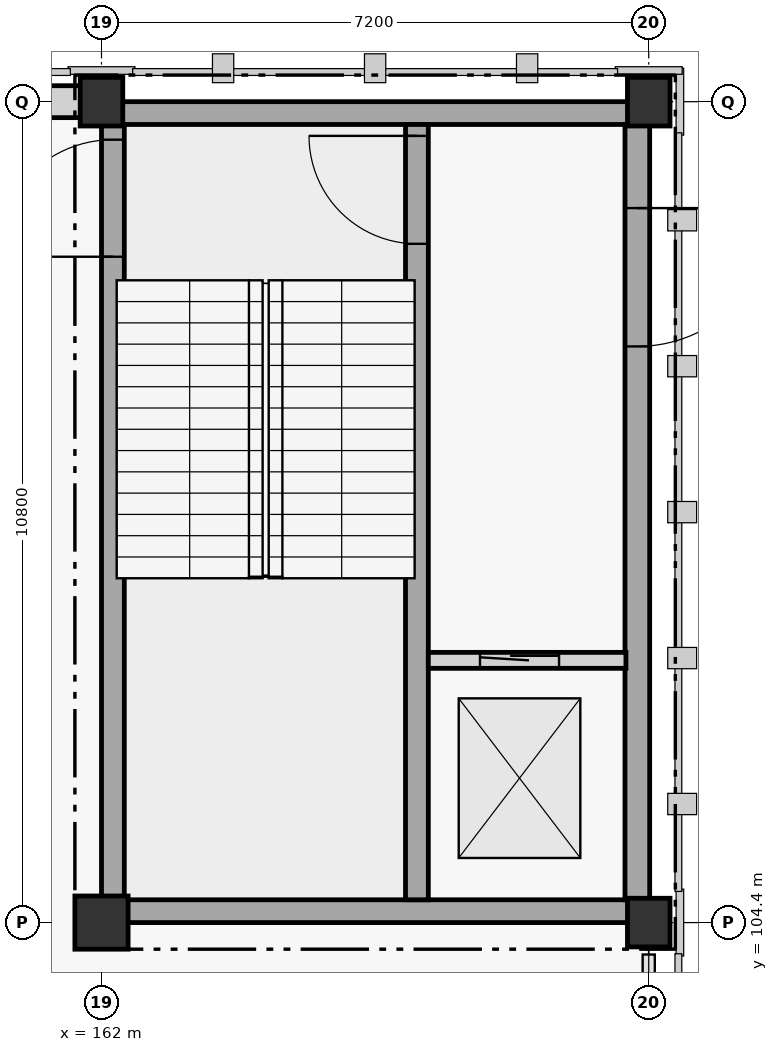
"""IFC4 building model, lengths in metres.
Left out: names, types, materials, properties, quantities, classifications, styles, units other than length and angle.
Written with IfcOpenShell. Run it as: python <this file> out.ifc"""

import sys

from ifc_helpers import new_model, si_unit, direction, frame, frame_2d, origin, origin_2d, place, context, subcontext, project, spatial, rectangle, extrude, element, fill, save


model = new_model("IFC4")
c1 = context("Model", 3, precision=1e-05, world=origin(), true_north=direction((0.0, 1.0)))
c2 = subcontext(c1, "Body", "Model", "MODEL_VIEW")
j1 = project(units=[si_unit("LENGTHUNIT", "METRE"), si_unit("PLANEANGLEUNIT", "RADIAN")], contexts=[c1])
p1 = place(None, origin())
s1 = spatial("IfcSite", under=j1, at=p1, CompositionType="ELEMENT")
p2 = place(p1, origin())
s2 = spatial("IfcBuilding", under=s1, at=p2, CompositionType="ELEMENT")
p3 = place(p2, origin())
s3 = spatial("IfcBuildingStorey", under=s2, at=p3, CompositionType="ELEMENT", Elevation=0.0)
p4 = place(p3, frame((162.0, 104.4, -0.3), z_axis=(0.0, 0.0, 1.0), x_axis=(1.0, 0.0, 0.0)))
e1 = element("IfcColumn", 1, at=p4, inside=s3, PredefinedType="COLUMN", context=c2, shape_type="SweptSolid", body=[
    extrude(rectangle(XDim=0.7, YDim=0.7, at=origin_2d()), origin(), (0.0, 0.0, 1.0), 5.7),
])
for number, where, z_axis, x_axis in (
    (2, (162.0, 115.2, -0.3), (0.0, 0.0, 1.0), (1.0, 0.0, 0.0)),
    (3, (169.2, 104.4, -0.3), (0.0, 0.0, 1.0), (1.0, 0.0, 0.0)),
    (4, (169.2, 115.2, -0.3), (0.0, 0.0, 1.0), (1.0, 0.0, 0.0)),
):
    element("IfcColumn", number, at=place(p3, frame(where, z_axis=z_axis, x_axis=x_axis)), inside=s3, PredefinedType="COLUMN", context=c2, shape_type="SweptSolid", body=[
        extrude(rectangle(XDim=0.56, YDim=0.64, at=origin_2d()), origin(), (0.0, 0.0, 1.0), 5.7),
    ])
for number, where, z_axis, x_axis in (
    (5, (169.2, 104.55, 0.0), (0.0, 0.0, 1.0), (-1.0, 0.0, 0.0)),
    (6, (162.0, 115.05, 0.0), (0.0, 0.0, 1.0), (1.0, 0.0, 0.0)),
):
    element("IfcWall", number, at=place(p3, frame(where, z_axis=z_axis, x_axis=x_axis)), inside=s3, PredefinedType="SHEAR", context=c2, shape_type="SweptSolid", body=[
        extrude(rectangle(XDim=7.2, YDim=0.3, at=frame_2d((3.6, 0.0))), origin(), (0.0, 0.0, 1.0), 5.4),
    ])
p5 = place(p3, frame((162.15, 104.7, 0.0), z_axis=(0.0, 0.0, 1.0), x_axis=(0.0, 1.0, 0.0)))
e7 = element("IfcWall", 7, at=p5, inside=s3, PredefinedType="SHEAR", context=c2, shape_type="SweptSolid", body=[
    extrude(rectangle(XDim=10.2, YDim=0.3, at=frame_2d((5.1, 0.0))), origin(), (0.0, 0.0, 1.0), 5.4),
])
p6 = place(p5, frame((8.46, 0.0, 0.0)))
e8 = element("IfcOpeningElement", 8, at=p6, cuts=e7, PredefinedType="OPENING", context=c2, shape_type="SweptSolid", body=[
    extrude(rectangle(XDim=1.54, YDim=2.22, at=frame_2d((0.77, 1.11))), frame((0.0, 0.15, 0.0), z_axis=(0.0, -1.0, 0.0), x_axis=(1.0, 0.0, 0.0)), (0.0, 0.0, 1.0), 0.3),
])
p7 = place(p3, frame((169.05, 114.9, 0.0), z_axis=(0.0, 0.0, 1.0), x_axis=(0.0, -1.0, 0.0)))
e9 = element("IfcWall", 9, at=p7, inside=s3, PredefinedType="SHEAR", context=c2, shape_type="SweptSolid", body=[
    extrude(rectangle(XDim=10.2, YDim=0.325, at=frame_2d((5.1, 0.0))), origin(), (0.0, 0.0, 1.0), 5.4),
])
p8 = place(p7, frame((1.1, 0.0, 0.0)))
e10 = element("IfcOpeningElement", 10, at=p8, cuts=e9, PredefinedType="OPENING", context=c2, shape_type="SweptSolid", body=[
    extrude(rectangle(XDim=1.82, YDim=2.22, at=frame_2d((0.91, 1.11))), frame((0.0, 0.163, 0.0), z_axis=(0.0, -1.0, 0.0), x_axis=(1.0, 0.0, 0.0)), (0.0, 0.0, 1.0), 0.325),
])
p9 = place(p3, frame((166.15, 104.7, 0.0), z_axis=(0.0, 0.0, 1.0), x_axis=(0.0, 1.0, 0.0)))
e11 = element("IfcWall", 11, at=p9, inside=s3, PredefinedType="SHEAR", context=c2, shape_type="SweptSolid", body=[
    extrude(rectangle(XDim=10.2, YDim=0.3, at=frame_2d((5.1, 0.0))), origin(), (0.0, 0.0, 1.0), 5.4),
])
p10 = place(p9, frame((8.63, 0.0, 0.0)))
e12 = element("IfcOpeningElement", 12, at=p10, cuts=e11, PredefinedType="OPENING", context=c2, shape_type="SweptSolid", body=[
    extrude(rectangle(XDim=1.42, YDim=2.2, at=frame_2d((0.71, 1.1))), frame((0.0, 0.15, 0.0), z_axis=(0.0, -1.0, 0.0), x_axis=(1.0, 0.0, 0.0)), (0.0, 0.0, 1.0), 0.3),
])
p11 = place(p3, frame((155.076, 115.2, 0.0), z_axis=(0.0, 0.0, 1.0), x_axis=(1.0, 0.0, 0.0)))
e13 = element("IfcWall", 13, at=p11, inside=s3, PredefinedType="STANDARD", context=c2, shape_type="SweptSolid", body=[
    extrude(rectangle(XDim=6.648, YDim=0.42, at=frame_2d((3.324, 0.0))), origin(), (0.0, 0.0, 1.0), 4.515),
])
p12 = place(p11, frame((1.954, 0.0, 0.9)))
e14 = element("IfcOpeningElement", 14, at=p12, cuts=e13, PredefinedType="OPENING", context=c2, shape_type="SweptSolid", body=[
    extrude(rectangle(XDim=2.74, YDim=1.82, at=frame_2d((1.37, 0.91))), frame((0.0, 0.21, 0.0), z_axis=(0.0, -1.0, 0.0), x_axis=(1.0, 0.0, 0.0)), (0.0, 0.0, 1.0), 0.42),
])
p13 = place(p3, frame((166.3, 107.85, 0.0), z_axis=(0.0, 0.0, 1.0), x_axis=(1.0, 0.0, 0.0)))
e15 = element("IfcWall", 15, at=p13, inside=s3, PredefinedType="STANDARD", context=c2, shape_type="SweptSolid", body=[
    extrude(rectangle(XDim=2.6, YDim=0.21, at=frame_2d((1.3, 0.0))), origin(), (0.0, 0.0, 1.0), 5.4),
])
p14 = place(p13, frame((0.68, 0.0, 0.0)))
e16 = element("IfcOpeningElement", 16, at=p14, cuts=e15, PredefinedType="OPENING", context=c2, shape_type="SweptSolid", body=[
    extrude(rectangle(XDim=1.04, YDim=2.16, at=frame_2d((0.52, 1.08))), frame((0.0, 0.105, 0.0), z_axis=(0.0, -1.0, 0.0), x_axis=(1.0, 0.0, 0.0)), (0.0, 0.0, 1.0), 0.21),
])
p15 = place(p8, origin())
e17 = element("IfcDoor", 17, at=p15, inside=s3, OperationType="SINGLE_SWING_LEFT", PredefinedType="DOOR", context=c2, shape_type="SweptSolid", body=[
    extrude(rectangle(XDim=1.82, YDim=2.22, at=frame_2d((0.91, 1.11))), frame((0.0, 0.025, 0.0), z_axis=(0.0, -1.0, 0.0), x_axis=(1.0, 0.0, 0.0)), (0.0, 0.0, 1.0), 0.05),
])
fill(e10, e17)
p16 = place(p14, origin())
e18 = element("IfcDoor", 18, at=p16, inside=s3, OperationType="SLIDING_TO_LEFT", PredefinedType="DOOR", context=c2, shape_type="SweptSolid", body=[
    extrude(rectangle(XDim=1.04, YDim=2.16, at=frame_2d((0.52, 1.08))), frame((0.0, 0.025, 0.0), z_axis=(0.0, -1.0, 0.0), x_axis=(1.0, 0.0, 0.0)), (0.0, 0.0, 1.0), 0.05),
])
fill(e16, e18)
p17 = place(p10, origin())
e19 = element("IfcDoor", 19, at=p17, inside=s3, OperationType="SINGLE_SWING_RIGHT", PredefinedType="DOOR", context=c2, shape_type="SweptSolid", body=[
    extrude(rectangle(XDim=1.42, YDim=2.2, at=frame_2d((0.71, 1.1))), frame((0.0, 0.025, 0.0), z_axis=(0.0, -1.0, 0.0), x_axis=(1.0, 0.0, 0.0)), (0.0, 0.0, 1.0), 0.05),
])
fill(e12, e19)
p18 = place(p6, origin())
e20 = element("IfcDoor", 20, at=p18, inside=s3, OperationType="SINGLE_SWING_LEFT", PredefinedType="DOOR", context=c2, shape_type="SweptSolid", body=[
    extrude(rectangle(XDim=1.54, YDim=2.22, at=frame_2d((0.77, 1.11))), frame((0.0, 0.025, 0.0), z_axis=(0.0, -1.0, 0.0), x_axis=(1.0, 0.0, 0.0)), (0.0, 0.0, 1.0), 0.05),
])
fill(e8, e20)
save(model, sys.argv[1])
